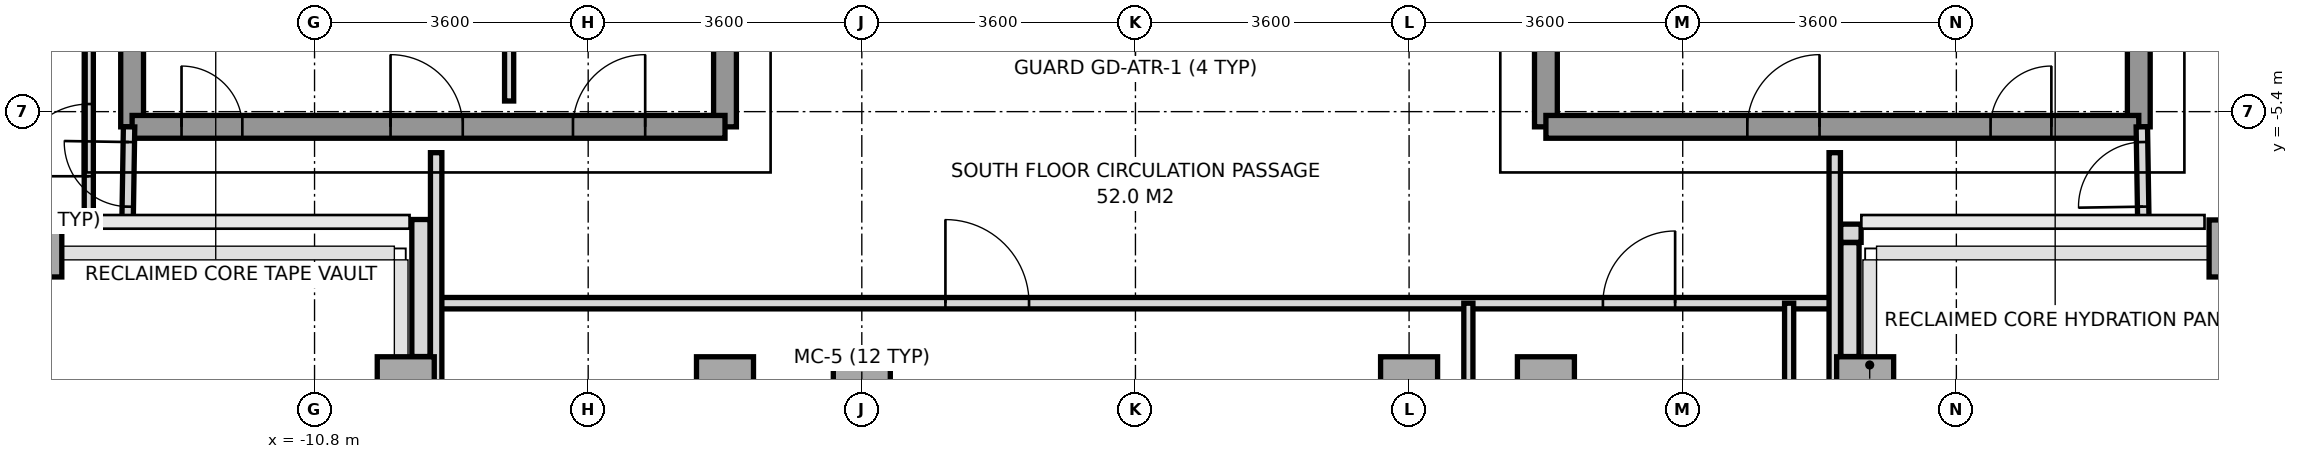
"""IFC4 building model, lengths in metres.
Left out: names, types, materials, properties, quantities, classifications, styles, units other than length and angle.
Written with IfcOpenShell. Run it as: python <this file> out.ifc"""

import sys

from ifc_helpers import new_model, si_unit, direction, frame, frame_2d, origin, origin_2d, place, context, subcontext, project, spatial, rectangle, extrude, source, transform, mapped, element, fill, save


model = new_model("IFC4")
c1 = context("Model", 3, precision=1e-05, world=origin(), true_north=direction((0.0, 1.0)))
c2 = subcontext(c1, "Body", "Model", "MODEL_VIEW")
j1 = project(units=[si_unit("LENGTHUNIT", "METRE"), si_unit("PLANEANGLEUNIT", "RADIAN")], contexts=[c1])
p1 = place(None, origin())
s1 = spatial("IfcSite", under=j1, at=p1, CompositionType="ELEMENT")
p2 = place(p1, origin())
s2 = spatial("IfcBuilding", under=s1, at=p2, CompositionType="ELEMENT")
p3 = place(p2, frame((0.0, 0.0, 219.4)))
s3 = spatial("IfcBuildingStorey", under=s2, at=p3, CompositionType="ELEMENT", Elevation=219.4)
m1 = source(origin(), c2, "Body", "SweptSolid", [
    extrude(rectangle(XDim=0.55, YDim=0.75, at=origin_2d()), origin(), (0.0, 0.0, 1.0), 4.01),
])
p4 = place(p3, frame((-14.4, -7.2, 0.0), z_axis=(0.0, 0.0, 1.0), x_axis=(1.0, 0.0, 0.0)))
e1 = element("IfcColumn", 1, at=p4, inside=s3, PredefinedType="COLUMN", context=c2, shape_type="MappedRepresentation", body=[
    mapped(m1, transform((0.0, 0.0, 0.0), x_axis=(1.0, 0.0, 0.0), y_axis=(0.0, 1.0, 0.0), z_axis=(0.0, 0.0, 1.0), scale=1.0)),
])
m2 = source(origin(), c2, "Body", "SweptSolid", [
    extrude(rectangle(XDim=0.75, YDim=0.75, at=origin_2d()), origin(), (0.0, 0.0, 1.0), 4.01),
])
for number, where, z_axis, x_axis in (
    (2, (-9.6, -9.0, 0.0), (0.0, 0.0, 1.0), (1.0, 0.0, 0.0)),
    (3, (-5.4, -9.0, 0.0), (0.0, 0.0, 1.0), (1.0, 0.0, 0.0)),
    (4, (-3.6, -9.0, 0.0), (0.0, 0.0, 1.0), (1.0, 0.0, 0.0)),
    (5, (3.6, -9.0, 0.0), (0.0, 0.0, 1.0), (1.0, 0.0, 0.0)),
    (6, (5.4, -9.0, 0.0), (0.0, 0.0, 1.0), (1.0, 0.0, 0.0)),
    (7, (9.6, -9.0, 0.0), (0.0, 0.0, 1.0), (1.0, 0.0, 0.0)),
):
    element("IfcColumn", number, at=place(p3, frame(where, z_axis=z_axis, x_axis=x_axis)), inside=s3, PredefinedType="COLUMN", context=c2, shape_type="MappedRepresentation", body=[
        mapped(m2, transform((0.0, 0.0, 0.0), x_axis=(1.0, 0.0, 0.0), y_axis=(0.0, 1.0, 0.0), z_axis=(0.0, 0.0, 1.0), scale=1.0)),
    ])
p5 = place(p3, frame((14.4, -7.2, 0.0), z_axis=(0.0, 0.0, 1.0), x_axis=(1.0, 0.0, 0.0)))
e8 = element("IfcColumn", 8, at=p5, inside=s3, PredefinedType="COLUMN", context=c2, shape_type="MappedRepresentation", body=[
    mapped(m1, transform((0.0, 0.0, 0.0), x_axis=(1.0, 0.0, 0.0), y_axis=(0.0, 1.0, 0.0), z_axis=(0.0, 0.0, 1.0), scale=1.0)),
])
p6 = place(p3, frame((9.547, -7.0, 0.0), z_axis=(0.0, 0.0, 1.0), x_axis=(-1.0, 0.0, 0.0)))
e9 = element("IfcWall", 9, at=p6, inside=s3, PredefinedType="PARAPET", context=c2, shape_type="SweptSolid", body=[
    extrude(rectangle(XDim=0.269, YDim=0.24, at=frame_2d((0.135, 0.0))), origin(), (0.0, 0.0, 1.0), 1.15),
])
p7 = place(p3, frame((9.4, -7.123, 0.0), z_axis=(0.0, 0.0, 1.0), x_axis=(0.0, -1.0, 0.0)))
e10 = element("IfcWall", 10, at=p7, inside=s3, PredefinedType="PARAPET", context=c2, shape_type="SweptSolid", body=[
    extrude(rectangle(XDim=1.499, YDim=0.24, at=frame_2d((0.75, 0.0))), origin(), (0.0, 0.0, 1.0), 1.15),
])
p8 = place(p3, frame((-9.4, -8.622, 0.0), z_axis=(0.0, 0.0, 1.0), x_axis=(0.0, 1.0, 0.0)))
e11 = element("IfcWall", 11, at=p8, inside=s3, PredefinedType="PARAPET", context=c2, shape_type="SweptSolid", body=[
    extrude(rectangle(XDim=1.803, YDim=0.24, at=frame_2d((0.901, 0.0))), origin(), (0.0, 0.0, 1.0), 1.15),
])
p9 = place(p3, frame((-13.2, -5.6, 0.0), z_axis=(0.0, 0.0, 1.0), x_axis=(0.0, 1.0, 0.0)))
e12 = element("IfcWall", 12, at=p9, inside=s3, PredefinedType="SHEAR", context=c2, shape_type="SweptSolid", body=[
    extrude(rectangle(XDim=11.2, YDim=0.3, at=frame_2d((5.6, 0.0))), origin(), (0.0, 0.0, 1.0), 4.01),
])
p10 = place(p3, frame((-5.4, -5.6, 0.0), z_axis=(0.0, 0.0, 1.0), x_axis=(0.0, 1.0, 0.0)))
e13 = element("IfcWall", 13, at=p10, inside=s3, PredefinedType="SHEAR", context=c2, shape_type="SweptSolid", body=[
    extrude(rectangle(XDim=12.5, YDim=0.3, at=frame_2d((6.25, 0.0))), origin(), (0.0, 0.0, 1.0), 4.01),
])
p11 = place(p10, frame((4.55, 0.0, 0.0)))
e14 = element("IfcOpeningElement", 14, at=p11, cuts=e13, PredefinedType="OPENING", context=c2, shape_type="SweptSolid", body=[
    extrude(rectangle(XDim=1.2, YDim=2.2, at=frame_2d((0.6, 1.1))), frame((0.0, 0.16, 0.0), z_axis=(0.0, -1.0, 0.0), x_axis=(1.0, 0.0, 0.0)), (0.0, 0.0, 1.0), 0.32),
])
p12 = place(p10, frame((10.45, 0.0, 0.0)))
e15 = element("IfcOpeningElement", 15, at=p12, cuts=e13, PredefinedType="OPENING", context=c2, shape_type="SweptSolid", body=[
    extrude(rectangle(XDim=1.2, YDim=2.2, at=frame_2d((0.6, 1.1))), frame((0.0, 0.16, 0.0), z_axis=(0.0, -1.0, 0.0), x_axis=(1.0, 0.0, 0.0)), (0.0, 0.0, 1.0), 0.32),
])
p13 = place(p10, frame((6.86, 0.0, 0.0)))
e16 = element("IfcOpeningElement", 16, at=p13, cuts=e13, PredefinedType="OPENING", context=c2, shape_type="SweptSolid", body=[
    extrude(rectangle(XDim=0.8, YDim=2.1, at=frame_2d((0.4, 1.05))), frame((0.0, 0.16, 0.0), z_axis=(0.0, -1.0, 0.0), x_axis=(1.0, 0.0, 0.0)), (0.0, 0.0, 1.0), 0.32),
])
p14 = place(p10, frame((7.88, 0.0, 0.0)))
e17 = element("IfcOpeningElement", 17, at=p14, cuts=e13, PredefinedType="OPENING", context=c2, shape_type="SweptSolid", body=[
    extrude(rectangle(XDim=0.8, YDim=2.1, at=frame_2d((0.4, 1.05))), frame((0.0, 0.16, 0.0), z_axis=(0.0, -1.0, 0.0), x_axis=(1.0, 0.0, 0.0)), (0.0, 0.0, 1.0), 0.32),
])
p15 = place(p3, frame((-13.2, -5.6, 0.0), z_axis=(0.0, 0.0, 1.0), x_axis=(1.0, 0.0, 0.0)))
e18 = element("IfcWall", 18, at=p15, inside=s3, PredefinedType="SHEAR", context=c2, shape_type="SweptSolid", body=[
    extrude(rectangle(XDim=7.8, YDim=0.3, at=frame_2d((3.9, 0.0))), origin(), (0.0, 0.0, 1.0), 4.01),
])
p16 = place(p15, frame((0.65, 0.0, 0.0)))
e19 = element("IfcOpeningElement", 19, at=p16, cuts=e18, PredefinedType="OPENING", context=c2, shape_type="SweptSolid", body=[
    extrude(rectangle(XDim=0.8, YDim=2.1, at=frame_2d((0.4, 1.05))), frame((0.0, 0.16, 0.0), z_axis=(0.0, -1.0, 0.0), x_axis=(1.0, 0.0, 0.0)), (0.0, 0.0, 1.0), 0.32),
])
p17 = place(p15, frame((3.4, 0.0, 0.0)))
e20 = element("IfcOpeningElement", 20, at=p17, cuts=e18, PredefinedType="OPENING", context=c2, shape_type="SweptSolid", body=[
    extrude(rectangle(XDim=0.95, YDim=2.15, at=frame_2d((0.475, 1.075))), frame((0.0, 0.16, 0.0), z_axis=(0.0, -1.0, 0.0), x_axis=(1.0, 0.0, 0.0)), (0.0, 0.0, 1.0), 0.32),
])
p18 = place(p15, frame((5.8, 0.0, 0.0)))
e21 = element("IfcOpeningElement", 21, at=p18, cuts=e18, PredefinedType="OPENING", context=c2, shape_type="SweptSolid", body=[
    extrude(rectangle(XDim=0.95, YDim=2.15, at=frame_2d((0.475, 1.075))), frame((0.0, 0.16, 0.0), z_axis=(0.0, -1.0, 0.0), x_axis=(1.0, 0.0, 0.0)), (0.0, 0.0, 1.0), 0.32),
])
p19 = place(p3, frame((13.2, -5.6, 0.0), z_axis=(0.0, 0.0, 1.0), x_axis=(0.0, 1.0, 0.0)))
e22 = element("IfcWall", 22, at=p19, inside=s3, PredefinedType="SHEAR", context=c2, shape_type="SweptSolid", body=[
    extrude(rectangle(XDim=11.2, YDim=0.3, at=frame_2d((5.6, 0.0))), origin(), (0.0, 0.0, 1.0), 4.01),
])
p20 = place(p3, frame((5.4, -5.6, 0.0), z_axis=(0.0, 0.0, 1.0), x_axis=(0.0, 1.0, 0.0)))
e23 = element("IfcWall", 23, at=p20, inside=s3, PredefinedType="SHEAR", context=c2, shape_type="SweptSolid", body=[
    extrude(rectangle(XDim=12.5, YDim=0.3, at=frame_2d((6.25, 0.0))), origin(), (0.0, 0.0, 1.0), 4.01),
])
p21 = place(p20, frame((4.55, 0.0, 0.0)))
e24 = element("IfcOpeningElement", 24, at=p21, cuts=e23, PredefinedType="OPENING", context=c2, shape_type="SweptSolid", body=[
    extrude(rectangle(XDim=1.2, YDim=2.2, at=frame_2d((0.6, 1.1))), frame((0.0, 0.16, 0.0), z_axis=(0.0, -1.0, 0.0), x_axis=(1.0, 0.0, 0.0)), (0.0, 0.0, 1.0), 0.32),
])
p22 = place(p20, frame((10.45, 0.0, 0.0)))
e25 = element("IfcOpeningElement", 25, at=p22, cuts=e23, PredefinedType="OPENING", context=c2, shape_type="SweptSolid", body=[
    extrude(rectangle(XDim=1.2, YDim=2.2, at=frame_2d((0.6, 1.1))), frame((0.0, 0.16, 0.0), z_axis=(0.0, -1.0, 0.0), x_axis=(1.0, 0.0, 0.0)), (0.0, 0.0, 1.0), 0.32),
])
p23 = place(p3, frame((5.4, -5.6, 0.0), z_axis=(0.0, 0.0, 1.0), x_axis=(1.0, 0.0, 0.0)))
e26 = element("IfcWall", 26, at=p23, inside=s3, PredefinedType="SHEAR", context=c2, shape_type="SweptSolid", body=[
    extrude(rectangle(XDim=7.8, YDim=0.3, at=frame_2d((3.9, 0.0))), origin(), (0.0, 0.0, 1.0), 4.01),
])
p24 = place(p23, frame((5.85, 0.0, 0.0)))
e27 = element("IfcOpeningElement", 27, at=p24, cuts=e26, PredefinedType="OPENING", context=c2, shape_type="SweptSolid", body=[
    extrude(rectangle(XDim=0.8, YDim=2.1, at=frame_2d((0.4, 1.05))), frame((0.0, 0.16, 0.0), z_axis=(0.0, -1.0, 0.0), x_axis=(1.0, 0.0, 0.0)), (0.0, 0.0, 1.0), 0.32),
])
p25 = place(p23, frame((2.65, 0.0, 0.0)))
e28 = element("IfcOpeningElement", 28, at=p25, cuts=e26, PredefinedType="OPENING", context=c2, shape_type="SweptSolid", body=[
    extrude(rectangle(XDim=0.95, YDim=2.15, at=frame_2d((0.475, 1.075))), frame((0.0, 0.16, 0.0), z_axis=(0.0, -1.0, 0.0), x_axis=(1.0, 0.0, 0.0)), (0.0, 0.0, 1.0), 0.32),
])
p26 = place(p3, frame((-8.24, -5.26, 0.0), z_axis=(0.0, 0.0, 1.0), x_axis=(0.0, 1.0, 0.0)))
e29 = element("IfcWall", 29, at=p26, inside=s3, PredefinedType="PARTITIONING", context=c2, shape_type="SweptSolid", body=[
    extrude(rectangle(XDim=2.94, YDim=0.12, at=frame_2d((1.47, 0.0))), origin(), (0.0, 0.0, 1.0), 4.01),
])
p27 = place(p3, frame((-9.2, -7.92, 0.0), z_axis=(0.0, 0.0, 1.0), x_axis=(1.0, 0.0, 0.0)))
e30 = element("IfcWall", 30, at=p27, inside=s3, PredefinedType="PARTITIONING", context=c2, shape_type="SweptSolid", body=[
    extrude(rectangle(XDim=18.4, YDim=0.15, at=frame_2d((9.2, 0.0))), origin(), (0.0, 0.0, 1.0), 3.57),
])
p28 = place(p27, frame((15.35, 0.0, 0.0)))
e31 = element("IfcOpeningElement", 31, at=p28, cuts=e30, PredefinedType="OPENING", context=c2, shape_type="SweptSolid", body=[
    extrude(rectangle(XDim=0.95, YDim=2.15, at=frame_2d((0.475, 1.075))), frame((0.0, 0.085, 0.0), z_axis=(0.0, -1.0, 0.0), x_axis=(1.0, 0.0, 0.0)), (0.0, 0.0, 1.0), 0.17),
])
p29 = place(p27, frame((6.7, 0.0, 0.0)))
e32 = element("IfcOpeningElement", 32, at=p29, cuts=e30, PredefinedType="OPENING", context=c2, shape_type="SweptSolid", body=[
    extrude(rectangle(XDim=1.1, YDim=2.2, at=frame_2d((0.55, 1.1))), frame((0.0, 0.085, 0.0), z_axis=(0.0, -1.0, 0.0), x_axis=(1.0, 0.0, 0.0)), (0.0, 0.0, 1.0), 0.17),
])
for number, where, z_axis, x_axis in (
    (33, (-9.2, -10.28, 0.0), (0.0, 0.0, 1.0), (0.0, 1.0, 0.0)),
    (34, (9.2, -10.28, 0.0), (0.0, 0.0, 1.0), (0.0, 1.0, 0.0)),
):
    element("IfcWall", number, at=place(p3, frame(where, z_axis=z_axis, x_axis=x_axis)), inside=s3, PredefinedType="PARTITIONING", context=c2, shape_type="SweptSolid", body=[
        extrude(rectangle(XDim=4.34, YDim=0.15, at=frame_2d((2.17, 0.0))), origin(), (0.0, 0.0, 1.0), 3.61),
    ])
for number, where, z_axis, x_axis in (
    (35, (4.38, -11.47, 0.0), (0.0, 0.0, 1.0), (0.0, 1.0, 0.0)),
    (36, (8.6, -11.47, 0.0), (0.0, 0.0, 1.0), (0.0, 1.0, 0.0)),
):
    element("IfcWall", number, at=place(p3, frame(where, z_axis=z_axis, x_axis=x_axis)), inside=s3, PredefinedType="PARTITIONING", context=c2, shape_type="SweptSolid", body=[
        extrude(rectangle(XDim=3.55, YDim=0.12, at=frame_2d((1.775, 0.0))), origin(), (0.0, 0.0, 1.0), 3.61),
    ])
p30 = place(p3, frame((-13.26, -6.85, 0.0), z_axis=(0.0, 0.0, 1.0), x_axis=(0.016013571389, 0.999871774545, 0.0)))
e37 = element("IfcWall", 37, at=p30, inside=s3, PredefinedType="PARTITIONING", context=c2, shape_type="SweptSolid", body=[
    extrude(rectangle(XDim=1.25, YDim=0.15, at=frame_2d((0.625, 0.0))), origin(), (0.0, 0.0, 1.0), 4.01),
])
p31 = place(p30, frame((0.2, 0.0, 0.0)))
e38 = element("IfcOpeningElement", 38, at=p31, cuts=e37, PredefinedType="OPENING", context=c2, shape_type="SweptSolid", body=[
    extrude(rectangle(XDim=0.85, YDim=2.1, at=frame_2d((0.425, 1.05))), frame((0.0, 0.085, 0.0), z_axis=(0.0, -1.0, 0.0), x_axis=(1.0, 0.0, 0.0)), (0.0, 0.0, 1.0), 0.17),
])
p32 = place(p3, frame((-13.77, -6.85, 0.0), z_axis=(0.0, 0.0, 1.0), x_axis=(0.0, 1.0, 0.0)))
e39 = element("IfcWall", 39, at=p32, inside=s3, PredefinedType="PARTITIONING", context=c2, shape_type="SweptSolid", body=[
    extrude(rectangle(XDim=13.7, YDim=0.12, at=frame_2d((6.85, 0.0))), origin(), (0.0, 0.0, 1.0), 3.71),
])
p33 = place(p32, frame((0.6, 0.0, 0.0)))
e40 = element("IfcOpeningElement", 40, at=p33, cuts=e39, PredefinedType="OPENING", context=c2, shape_type="SweptSolid", body=[
    extrude(rectangle(XDim=0.95, YDim=2.15, at=frame_2d((0.475, 1.075))), frame((0.0, 0.07, 0.0), z_axis=(0.0, -1.0, 0.0), x_axis=(1.0, 0.0, 0.0)), (0.0, 0.0, 1.0), 0.14),
])
p34 = place(p3, frame((13.26, -6.85, 0.0), z_axis=(0.0, 0.0, 1.0), x_axis=(-0.016013571389, 0.999871774545, 0.0)))
e41 = element("IfcWall", 41, at=p34, inside=s3, PredefinedType="PARTITIONING", context=c2, shape_type="SweptSolid", body=[
    extrude(rectangle(XDim=1.25, YDim=0.15, at=frame_2d((0.625, 0.0))), origin(), (0.0, 0.0, 1.0), 4.01),
])
p35 = place(p34, frame((0.2, 0.0, 0.0)))
e42 = element("IfcOpeningElement", 42, at=p35, cuts=e41, PredefinedType="OPENING", context=c2, shape_type="SweptSolid", body=[
    extrude(rectangle(XDim=0.85, YDim=2.1, at=frame_2d((0.425, 1.05))), frame((0.0, 0.085, 0.0), z_axis=(0.0, -1.0, 0.0), x_axis=(1.0, 0.0, 0.0)), (0.0, 0.0, 1.0), 0.17),
])
m3 = source(origin(), c2, "Body", "SweptSolid", [
    extrude(rectangle(XDim=0.8, YDim=2.1, at=frame_2d((0.4, 1.05))), frame((0.0, 0.025, 0.0), z_axis=(0.0, -1.0, 0.0), x_axis=(1.0, 0.0, 0.0)), (0.0, 0.0, 1.0), 0.05),
])
p36 = place(p16, origin())
e43 = element("IfcDoor", 43, at=p36, inside=s3, OperationType="SINGLE_SWING_LEFT", PredefinedType="DOOR", context=c2, shape_type="MappedRepresentation", body=[
    mapped(m3, transform((0.0, 0.0, 0.0), x_axis=(1.0, 0.0, 0.0), y_axis=(0.0, 1.0, 0.0), z_axis=(0.0, 0.0, 1.0), scale=1.0)),
])
fill(e19, e43)
p37 = place(p24, origin())
e44 = element("IfcDoor", 44, at=p37, inside=s3, OperationType="SINGLE_SWING_RIGHT", PredefinedType="DOOR", context=c2, shape_type="MappedRepresentation", body=[
    mapped(m3, transform((0.0, 0.0, 0.0), x_axis=(1.0, 0.0, 0.0), y_axis=(0.0, 1.0, 0.0), z_axis=(0.0, 0.0, 1.0), scale=1.0)),
])
fill(e27, e44)
m4 = source(origin(), c2, "Body", "SweptSolid", [
    extrude(rectangle(XDim=0.95, YDim=2.15, at=frame_2d((0.475, 1.075))), frame((0.0, 0.025, 0.0), z_axis=(0.0, -1.0, 0.0), x_axis=(1.0, 0.0, 0.0)), (0.0, 0.0, 1.0), 0.05),
])
p38 = place(p17, origin())
e45 = element("IfcDoor", 45, at=p38, inside=s3, OperationType="SINGLE_SWING_LEFT", PredefinedType="DOOR", context=c2, shape_type="MappedRepresentation", body=[
    mapped(m4, transform((0.0, 0.0, 0.0), x_axis=(1.0, 0.0, 0.0), y_axis=(0.0, 1.0, 0.0), z_axis=(0.0, 0.0, 1.0), scale=1.0)),
])
fill(e20, e45)
p39 = place(p18, origin())
e46 = element("IfcDoor", 46, at=p39, inside=s3, OperationType="SINGLE_SWING_RIGHT", PredefinedType="DOOR", context=c2, shape_type="MappedRepresentation", body=[
    mapped(m4, transform((0.0, 0.0, 0.0), x_axis=(1.0, 0.0, 0.0), y_axis=(0.0, 1.0, 0.0), z_axis=(0.0, 0.0, 1.0), scale=1.0)),
])
fill(e21, e46)
p40 = place(p25, origin())
e47 = element("IfcDoor", 47, at=p40, inside=s3, OperationType="SINGLE_SWING_RIGHT", PredefinedType="DOOR", context=c2, shape_type="MappedRepresentation", body=[
    mapped(m4, transform((0.0, 0.0, 0.0), x_axis=(1.0, 0.0, 0.0), y_axis=(0.0, 1.0, 0.0), z_axis=(0.0, 0.0, 1.0), scale=1.0)),
])
fill(e28, e47)
p41 = place(p28, origin())
e48 = element("IfcDoor", 48, at=p41, inside=s3, OperationType="SINGLE_SWING_RIGHT", PredefinedType="DOOR", context=c2, shape_type="MappedRepresentation", body=[
    mapped(m4, transform((0.0, 0.0, 0.0), x_axis=(1.0, 0.0, 0.0), y_axis=(0.0, 1.0, 0.0), z_axis=(0.0, 0.0, 1.0), scale=1.0)),
])
fill(e31, e48)
m5 = source(origin(), c2, "Body", "SweptSolid", [
    extrude(rectangle(XDim=1.1, YDim=2.2, at=frame_2d((0.55, 1.1))), frame((0.0, 0.025, 0.0), z_axis=(0.0, -1.0, 0.0), x_axis=(1.0, 0.0, 0.0)), (0.0, 0.0, 1.0), 0.05),
])
p42 = place(p29, origin())
e49 = element("IfcDoor", 49, at=p42, inside=s3, OperationType="SINGLE_SWING_LEFT", PredefinedType="DOOR", context=c2, shape_type="MappedRepresentation", body=[
    mapped(m5, transform((0.0, 0.0, 0.0), x_axis=(1.0, 0.0, 0.0), y_axis=(0.0, 1.0, 0.0), z_axis=(0.0, 0.0, 1.0), scale=1.0)),
])
fill(e32, e49)
p43 = place(p33, origin())
e50 = element("IfcDoor", 50, at=p43, inside=s3, OperationType="SINGLE_SWING_LEFT", PredefinedType="DOOR", context=c2, shape_type="MappedRepresentation", body=[
    mapped(m4, transform((0.0, 0.0, 0.0), x_axis=(1.0, 0.0, 0.0), y_axis=(0.0, 1.0, 0.0), z_axis=(0.0, 0.0, 1.0), scale=1.0)),
])
fill(e40, e50)
m6 = source(origin(), c2, "Body", "SweptSolid", [
    extrude(rectangle(XDim=0.85, YDim=2.1, at=frame_2d((0.425, 1.05))), frame((0.0, 0.025, 0.0), z_axis=(0.0, -1.0, 0.0), x_axis=(1.0, 0.0, 0.0)), (0.0, 0.0, 1.0), 0.05),
])
p44 = place(p31, origin())
e51 = element("IfcDoor", 51, at=p44, inside=s3, OperationType="SINGLE_SWING_RIGHT", PredefinedType="DOOR", context=c2, shape_type="MappedRepresentation", body=[
    mapped(m6, transform((0.0, 0.0, 0.0), x_axis=(1.0, 0.0, 0.0), y_axis=(0.0, 1.0, 0.0), z_axis=(0.0, 0.0, 1.0), scale=1.0)),
])
fill(e38, e51)
p45 = place(p35, origin())
e52 = element("IfcDoor", 52, at=p45, inside=s3, OperationType="SINGLE_SWING_LEFT", PredefinedType="DOOR", context=c2, shape_type="MappedRepresentation", body=[
    mapped(m6, transform((0.0, 0.0, 0.0), x_axis=(1.0, 0.0, 0.0), y_axis=(0.0, 1.0, 0.0), z_axis=(0.0, 0.0, 1.0), scale=1.0)),
])
fill(e42, e52)
save(model, sys.argv[1])
